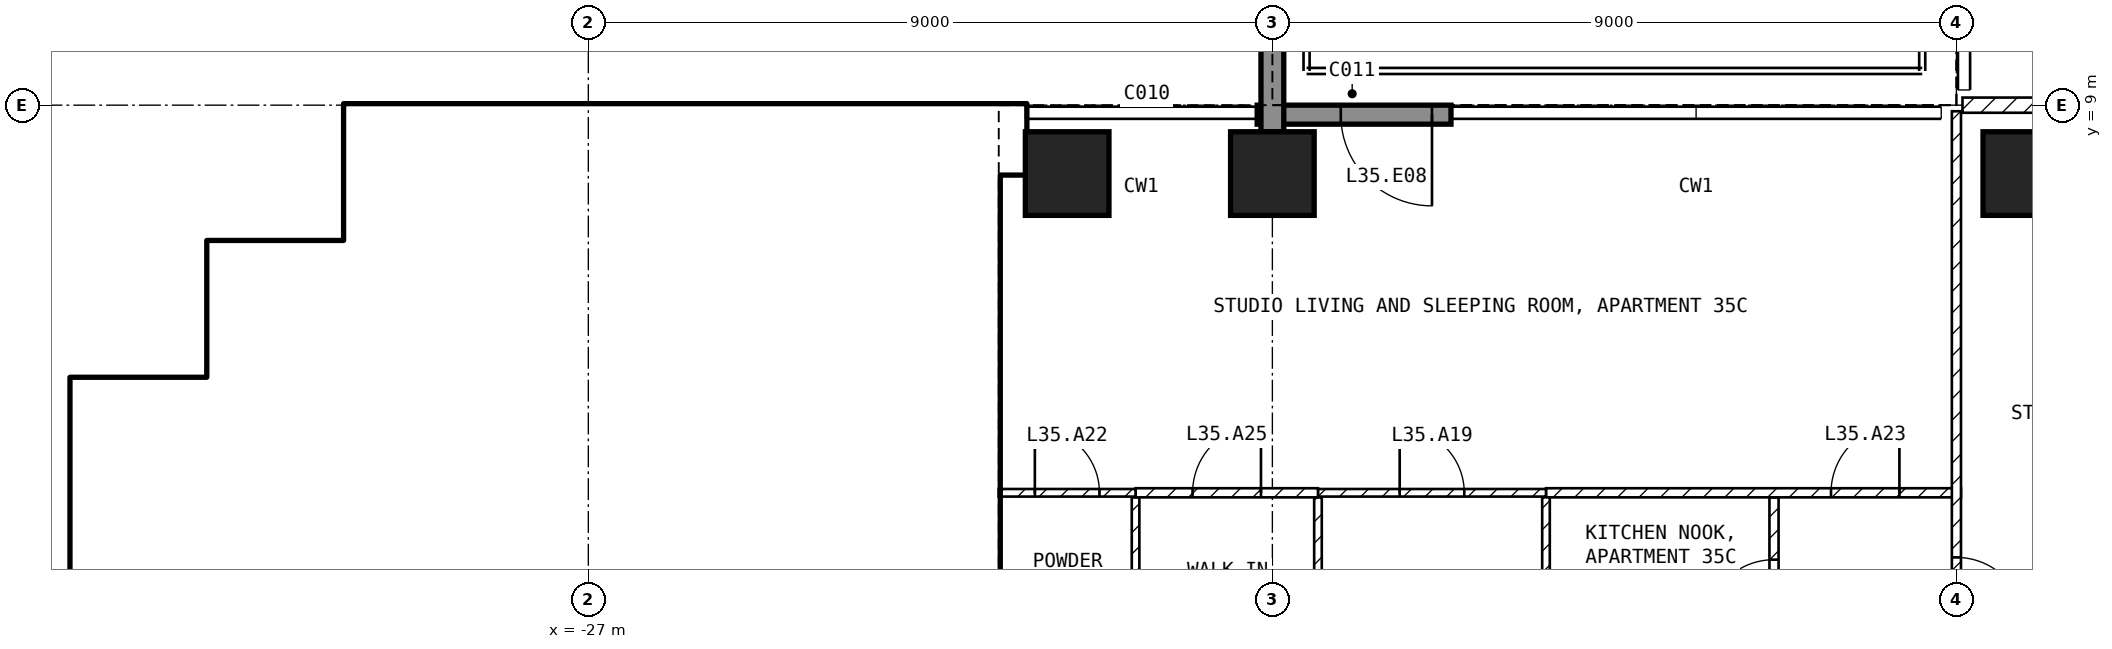
"""IFC4 building model, lengths in metres.
Left out: names, types, materials, properties, quantities, classifications, styles, units other than length and angle.
Written with IfcOpenShell. Run it as: python <this file> out.ifc"""

import sys

from ifc_helpers import new_model, si_unit, direction, frame, frame_2d, origin, origin_2d, place, context, subcontext, project, spatial, rectangle, extrude, element, fill, save


model = new_model("IFC4")
c1 = context("Model", 3, precision=1e-05, world=origin(), true_north=direction((0.0, 1.0)))
c2 = subcontext(c1, "Body", "Model", "MODEL_VIEW")
j1 = project(units=[si_unit("LENGTHUNIT", "METRE"), si_unit("PLANEANGLEUNIT", "RADIAN")], contexts=[c1])
p1 = place(None, origin())
s1 = spatial("IfcSite", under=j1, at=p1, CompositionType="ELEMENT")
p2 = place(p1, origin())
s2 = spatial("IfcBuilding", under=s1, at=p2, CompositionType="ELEMENT")
p3 = place(p2, frame((0.0, 0.0, 144.4)))
s3 = spatial("IfcBuildingStorey", under=s2, at=p3, CompositionType="ELEMENT", Elevation=144.4)
for number, where, z_axis, x_axis in (
    (1, (-20.7, 8.1, -0.25), (0.0, 0.0, 1.0), (1.0, 0.0, 0.0)),
    (2, (-18.0, 8.1, -0.25), (0.0, 0.0, 1.0), (1.0, 0.0, 0.0)),
    (3, (-8.1, 8.1, -0.25), (0.0, 0.0, 1.0), (1.0, 0.0, 0.0)),
):
    element("IfcColumn", number, at=place(p3, frame(where, z_axis=z_axis, x_axis=x_axis)), inside=s3, PredefinedType="COLUMN", context=c2, shape_type="SweptSolid", body=[
        extrude(rectangle(XDim=1.1, YDim=1.1, at=origin_2d()), origin(), (0.0, 0.0, 1.0), 3.5),
    ])
p4 = place(p3, frame((-15.65, 8.875, 0.0), z_axis=(0.0, 0.0, 1.0), x_axis=(-1.0, 0.0, 0.0)))
e4 = element("IfcWall", 4, at=p4, inside=s3, PredefinedType="SOLIDWALL", context=c2, shape_type="SweptSolid", body=[
    extrude(rectangle(XDim=2.55, YDim=0.25, at=frame_2d((1.275, 0.0))), origin(), (0.0, 0.0, 1.0), 3.25),
])
p5 = place(p4, frame((0.25, 0.0, 0.0)))
e5 = element("IfcOpeningElement", 5, at=p5, cuts=e4, PredefinedType="OPENING", context=c2, shape_type="SweptSolid", body=[
    extrude(rectangle(XDim=1.2, YDim=2.4, at=frame_2d((0.6, 1.2))), frame((0.0, 0.135, 0.0), z_axis=(0.0, -1.0, 0.0), x_axis=(1.0, 0.0, 0.0)), (0.0, 0.0, 1.0), 0.27),
])
p6 = place(p3, frame((-18.0, 8.65, 0.0), z_axis=(0.0, 0.0, 1.0), x_axis=(0.0, 1.0, 0.0)))
e6 = element("IfcWall", 6, at=p6, inside=s3, PredefinedType="SOLIDWALL", context=c2, shape_type="SweptSolid", body=[
    extrude(rectangle(XDim=3.09, YDim=0.3, at=frame_2d((1.545, 0.0))), origin(), (0.0, 0.0, 1.0), 3.25),
])
p7 = place(p3, frame((-33.425, -4.65, 0.0), z_axis=(0.0, 0.0, 1.0), x_axis=(0.0, 1.0, 0.0)))
e7 = element("IfcWall", 7, at=p7, inside=s3, PredefinedType="SHEAR", context=c2, shape_type="SweptSolid", body=[
    extrude(rectangle(XDim=10.05, YDim=0.75, at=frame_2d((5.025, 0.0))), origin(), (0.0, 0.0, 1.0), 3.25),
])
for number, where, z_axis, x_axis in (
    (8, (-33.05, 5.025, 0.0), (0.0, 0.0, 1.0), (1.0, 0.0, 0.0)),
    (9, (-31.625, 5.4, 0.0), (0.0, 0.0, 1.0), (0.0, 1.0, 0.0)),
):
    element("IfcWall", number, at=place(p3, frame(where, z_axis=z_axis, x_axis=x_axis)), inside=s3, PredefinedType="SHEAR", context=c2, shape_type="SweptSolid", body=[
        extrude(rectangle(XDim=1.8, YDim=0.75, at=frame_2d((0.9, 0.0))), origin(), (0.0, 0.0, 1.0), 3.25),
    ])
p8 = place(p3, frame((-31.25, 6.825, 0.0), z_axis=(0.0, 0.0, 1.0), x_axis=(1.0, 0.0, 0.0)))
e10 = element("IfcWall", 10, at=p8, inside=s3, PredefinedType="SHEAR", context=c2, shape_type="SweptSolid", body=[
    extrude(rectangle(XDim=2.175, YDim=0.75, at=frame_2d((1.087, 0.0))), origin(), (0.0, 0.0, 1.0), 3.25),
])
p9 = place(p3, frame((-29.825, 7.2, 0.0), z_axis=(0.0, 0.0, 1.0), x_axis=(0.0, 1.0, 0.0)))
e11 = element("IfcWall", 11, at=p9, inside=s3, PredefinedType="SHEAR", context=c2, shape_type="SweptSolid", body=[
    extrude(rectangle(XDim=1.8, YDim=0.75, at=frame_2d((0.9, 0.0))), origin(), (0.0, 0.0, 1.0), 3.25),
])
p10 = place(p3, frame((-29.45, 8.55, 0.0), z_axis=(0.0, 0.0, 1.0), x_axis=(1.0, 0.0, 0.0)))
e12 = element("IfcWall", 12, at=p10, inside=s3, PredefinedType="SHEAR", context=c2, shape_type="SweptSolid", body=[
    extrude(rectangle(XDim=8.2, YDim=0.9, at=frame_2d((4.1, 0.0))), origin(), (0.0, 0.0, 1.0), 3.25),
])
p11 = place(p3, frame((-21.825, 1.2, 0.0), z_axis=(0.0, 0.0, 1.0), x_axis=(0.0, 1.0, 0.0)))
e13 = element("IfcWall", 13, at=p11, inside=s3, PredefinedType="SHEAR", context=c2, shape_type="SweptSolid", body=[
    extrude(rectangle(XDim=6.9, YDim=0.45, at=frame_2d((3.45, 0.0))), origin(), (0.0, 0.0, 1.0), 3.25),
])
p12 = place(p3, frame((-28.35, 5.15, 0.0), z_axis=(0.0, 0.0, 1.0), x_axis=(1.0, 0.0, 0.0)))
e14 = element("IfcWall", 14, at=p12, inside=s3, PredefinedType="SOLIDWALL", context=c2, shape_type="SweptSolid", body=[
    extrude(rectangle(XDim=6.3, YDim=0.2, at=frame_2d((3.15, 0.0))), origin(), (0.0, 0.0, 1.0), 3.25),
])
p13 = place(p12, frame((5.1, 0.0, 0.0)))
e15 = element("IfcOpeningElement", 15, at=p13, cuts=e14, PredefinedType="OPENING", context=c2, shape_type="SweptSolid", body=[
    extrude(rectangle(XDim=1.0, YDim=2.1, at=frame_2d((0.5, 1.05))), frame((0.0, 0.11, 0.0), z_axis=(0.0, -1.0, 0.0), x_axis=(1.0, 0.0, 0.0)), (0.0, 0.0, 1.0), 0.22),
])
p14 = place(p3, frame((-28.25, 5.25, 0.0), z_axis=(0.0, 0.0, 1.0), x_axis=(0.0, 1.0, 0.0)))
e16 = element("IfcWall", 16, at=p14, inside=s3, PredefinedType="SOLIDWALL", context=c2, shape_type="SweptSolid", body=[
    extrude(rectangle(XDim=2.85, YDim=0.2, at=frame_2d((1.425, 0.0))), origin(), (0.0, 0.0, 1.0), 3.25),
])
p15 = place(p3, frame((-33.05, 3.95, 0.0), z_axis=(0.0, 0.0, 1.0), x_axis=(1.0, 0.0, 0.0)))
e17 = element("IfcWall", 17, at=p15, inside=s3, PredefinedType="SOLIDWALL", context=c2, shape_type="SweptSolid", body=[
    extrude(rectangle(XDim=5.85, YDim=0.2, at=frame_2d((2.925, 0.0))), origin(), (0.0, 0.0, 1.0), 3.25),
])
p16 = place(p3, frame((-27.1, 1.55, 0.0), z_axis=(0.0, 0.0, 1.0), x_axis=(0.0, 1.0, 0.0)))
e18 = element("IfcWall", 18, at=p16, inside=s3, PredefinedType="SOLIDWALL", context=c2, shape_type="SweptSolid", body=[
    extrude(rectangle(XDim=3.5, YDim=0.2, at=frame_2d((1.75, 0.0))), origin(), (0.0, 0.0, 1.0), 3.25),
])
p17 = place(p16, frame((0.6, 0.0, 0.0)))
e19 = element("IfcOpeningElement", 19, at=p17, cuts=e18, PredefinedType="OPENING", context=c2, shape_type="SweptSolid", body=[
    extrude(rectangle(XDim=1.1, YDim=2.1, at=frame_2d((0.55, 1.05))), frame((0.0, 0.11, 0.0), z_axis=(0.0, -1.0, 0.0), x_axis=(1.0, 0.0, 0.0)), (0.0, 0.0, 1.0), 0.22),
])
p18 = place(p16, frame((2.6, 0.0, 0.0)))
e20 = element("IfcOpeningElement", 20, at=p18, cuts=e18, PredefinedType="OPENING", context=c2, shape_type="SweptSolid", body=[
    extrude(rectangle(XDim=0.8, YDim=2.1, at=frame_2d((0.4, 1.05))), frame((0.0, 0.11, 0.0), z_axis=(0.0, -1.0, 0.0), x_axis=(1.0, 0.0, 0.0)), (0.0, 0.0, 1.0), 0.22),
])
p19 = place(p3, frame((-30.0, 1.55, 0.0), z_axis=(0.0, 0.0, 1.0), x_axis=(0.0, 1.0, 0.0)))
e21 = element("IfcWall", 21, at=p19, inside=s3, PredefinedType="SOLIDWALL", context=c2, shape_type="SweptSolid", body=[
    extrude(rectangle(XDim=2.3, YDim=0.2, at=frame_2d((1.15, 0.0))), origin(), (0.0, 0.0, 1.0), 3.25),
])
p20 = place(p3, frame((-29.0, 4.05, 0.0), z_axis=(0.0, 0.0, 1.0), x_axis=(0.0, 1.0, 0.0)))
e22 = element("IfcWall", 22, at=p20, inside=s3, PredefinedType="PARTITIONING", context=c2, shape_type="SweptSolid", body=[
    extrude(rectangle(XDim=4.05, YDim=0.15, at=frame_2d((2.025, 0.0))), origin(), (0.0, 0.0, 1.0), 3.25),
])
p21 = place(p20, frame((0.1, 0.0, 0.0)))
e23 = element("IfcOpeningElement", 23, at=p21, cuts=e22, PredefinedType="OPENING", context=c2, shape_type="SweptSolid", body=[
    extrude(rectangle(XDim=0.8, YDim=2.1, at=frame_2d((0.4, 1.05))), frame((0.0, 0.085, 0.0), z_axis=(0.0, -1.0, 0.0), x_axis=(1.0, 0.0, 0.0)), (0.0, 0.0, 1.0), 0.17),
])
p22 = place(p3, frame((-8.92, 9.0, 0.0), z_axis=(0.0, 0.0, 1.0), x_axis=(1.0, 0.0, 0.0)))
e24 = element("IfcWall", 24, at=p22, inside=s3, PredefinedType="PARTITIONING", context=c2, shape_type="SweptSolid", body=[
    extrude(rectangle(XDim=17.84, YDim=0.2, at=frame_2d((8.92, 0.0))), origin(), (0.0, 0.0, 1.0), 3.25),
])
p23 = place(p22, frame((8.42, 0.0, 0.0)))
e25 = element("IfcOpeningElement", 25, at=p23, cuts=e24, PredefinedType="OPENING", context=c2, shape_type="SweptSolid", body=[
    extrude(rectangle(XDim=1.0, YDim=2.1, at=frame_2d((0.5, 1.05))), frame((0.0, 0.11, 0.0), z_axis=(0.0, -1.0, 0.0), x_axis=(1.0, 0.0, 0.0)), (0.0, 0.0, 1.0), 0.22),
])
p24 = place(p3, frame((-11.4, 1.3, 0.0), z_axis=(0.0, 0.0, 1.0), x_axis=(0.0, 1.0, 0.0)))
e26 = element("IfcWall", 26, at=p24, inside=s3, PredefinedType="PARTITIONING", context=c2, shape_type="SweptSolid", body=[
    extrude(rectangle(XDim=2.54, YDim=0.12, at=frame_2d((1.27, 0.0))), origin(), (0.0, 0.0, 1.0), 3.25),
])
p25 = place(p24, frame((0.82, 0.0, 0.0)))
e27 = element("IfcOpeningElement", 27, at=p25, cuts=e26, PredefinedType="OPENING", context=c2, shape_type="SweptSolid", body=[
    extrude(rectangle(XDim=0.9, YDim=2.1, at=frame_2d((0.45, 1.05))), frame((0.0, 0.07, 0.0), z_axis=(0.0, -1.0, 0.0), x_axis=(1.0, 0.0, 0.0)), (0.0, 0.0, 1.0), 0.14),
])
p26 = place(p3, frame((-14.4, 3.9, 0.0), z_axis=(0.0, 0.0, 1.0), x_axis=(1.0, 0.0, 0.0)))
e28 = element("IfcWall", 28, at=p26, inside=s3, PredefinedType="PARTITIONING", context=c2, shape_type="SweptSolid", body=[
    extrude(rectangle(XDim=5.46, YDim=0.12, at=frame_2d((2.73, 0.0))), origin(), (0.0, 0.0, 1.0), 3.25),
])
p27 = place(p26, frame((3.75, 0.0, 0.0)))
e29 = element("IfcOpeningElement", 29, at=p27, cuts=e28, PredefinedType="OPENING", context=c2, shape_type="SweptSolid", body=[
    extrude(rectangle(XDim=0.9, YDim=2.1, at=frame_2d((0.45, 1.05))), frame((0.0, 0.07, 0.0), z_axis=(0.0, -1.0, 0.0), x_axis=(1.0, 0.0, 0.0)), (0.0, 0.0, 1.0), 0.14),
])
p28 = place(p3, frame((-9.0, 8.92, 0.0), z_axis=(0.0, 0.0, 1.0), x_axis=(0.0, -1.0, 0.0)))
e30 = element("IfcWall", 30, at=p28, inside=s3, PredefinedType="PARTITIONING", context=c2, shape_type="SweptSolid", body=[
    extrude(rectangle(XDim=7.62, YDim=0.12, at=frame_2d((3.81, 0.0))), origin(), (0.0, 0.0, 1.0), 3.25),
])
p29 = place(p28, frame((5.87, 0.0, 0.0)))
e31 = element("IfcOpeningElement", 31, at=p29, cuts=e30, PredefinedType="OPENING", context=c2, shape_type="SweptSolid", body=[
    extrude(rectangle(XDim=0.9, YDim=2.1, at=frame_2d((0.45, 1.05))), frame((0.0, 0.07, 0.0), z_axis=(0.0, -1.0, 0.0), x_axis=(1.0, 0.0, 0.0)), (0.0, 0.0, 1.0), 0.14),
])
for number, where, z_axis, x_axis in (
    (32, (-14.4, 1.3, 0.0), (0.0, 0.0, 1.0), (0.0, 1.0, 0.0)),
    (33, (-17.4, 1.3, 0.0), (0.0, 0.0, 1.0), (0.0, 1.0, 0.0)),
):
    element("IfcWall", number, at=place(p3, frame(where, z_axis=z_axis, x_axis=x_axis)), inside=s3, PredefinedType="PARTITIONING", context=c2, shape_type="SweptSolid", body=[
        extrude(rectangle(XDim=2.54, YDim=0.1, at=frame_2d((1.27, 0.0))), origin(), (0.0, 0.0, 1.0), 3.25),
    ])
p30 = place(p3, frame((-17.4, 3.9, 0.0), z_axis=(0.0, 0.0, 1.0), x_axis=(1.0, 0.0, 0.0)))
e34 = element("IfcWall", 34, at=p30, inside=s3, PredefinedType="PARTITIONING", context=c2, shape_type="SweptSolid", body=[
    extrude(rectangle(XDim=3.0, YDim=0.1, at=frame_2d((1.5, 0.0))), origin(), (0.0, 0.0, 1.0), 3.25),
])
p31 = place(p30, frame((1.075, 0.0, 0.0)))
e35 = element("IfcOpeningElement", 35, at=p31, cuts=e34, PredefinedType="OPENING", context=c2, shape_type="SweptSolid", body=[
    extrude(rectangle(XDim=0.85, YDim=2.1, at=frame_2d((0.425, 1.05))), frame((0.0, 0.06, 0.0), z_axis=(0.0, -1.0, 0.0), x_axis=(1.0, 0.0, 0.0)), (0.0, 0.0, 1.0), 0.12),
])
p32 = place(p3, frame((-19.8, 1.3, 0.0), z_axis=(0.0, 0.0, 1.0), x_axis=(0.0, 1.0, 0.0)))
e36 = element("IfcWall", 36, at=p32, inside=s3, PredefinedType="PARTITIONING", context=c2, shape_type="SweptSolid", body=[
    extrude(rectangle(XDim=2.54, YDim=0.1, at=frame_2d((1.27, 0.0))), origin(), (0.0, 0.0, 1.0), 3.25),
])
p33 = place(p3, frame((-19.8, 3.9, 0.0), z_axis=(0.0, 0.0, 1.0), x_axis=(1.0, 0.0, 0.0)))
e37 = element("IfcWall", 37, at=p33, inside=s3, PredefinedType="PARTITIONING", context=c2, shape_type="SweptSolid", body=[
    extrude(rectangle(XDim=2.4, YDim=0.12, at=frame_2d((1.2, 0.0))), origin(), (0.0, 0.0, 1.0), 3.25),
])
p34 = place(p33, frame((0.75, 0.0, 0.0)))
e38 = element("IfcOpeningElement", 38, at=p34, cuts=e37, PredefinedType="OPENING", context=c2, shape_type="SweptSolid", body=[
    extrude(rectangle(XDim=0.9, YDim=2.1, at=frame_2d((0.45, 1.05))), frame((0.0, 0.07, 0.0), z_axis=(0.0, -1.0, 0.0), x_axis=(1.0, 0.0, 0.0)), (0.0, 0.0, 1.0), 0.14),
])
p35 = place(p3, frame((-21.6, 3.9, 0.0), z_axis=(0.0, 0.0, 1.0), x_axis=(1.0, 0.0, 0.0)))
e39 = element("IfcWall", 39, at=p35, inside=s3, PredefinedType="PARTITIONING", context=c2, shape_type="SweptSolid", body=[
    extrude(rectangle(XDim=1.8, YDim=0.1, at=frame_2d((0.9, 0.0))), origin(), (0.0, 0.0, 1.0), 3.25),
])
p36 = place(p35, frame((0.475, 0.0, 0.0)))
e40 = element("IfcOpeningElement", 40, at=p36, cuts=e39, PredefinedType="OPENING", context=c2, shape_type="SweptSolid", body=[
    extrude(rectangle(XDim=0.85, YDim=2.1, at=frame_2d((0.425, 1.05))), frame((0.0, 0.06, 0.0), z_axis=(0.0, -1.0, 0.0), x_axis=(1.0, 0.0, 0.0)), (0.0, 0.0, 1.0), 0.12),
])
p37 = place(p5, origin())
e41 = element("IfcDoor", 41, at=p37, inside=s3, OperationType="SINGLE_SWING_LEFT", PredefinedType="DOOR", context=c2, shape_type="SweptSolid", body=[
    extrude(rectangle(XDim=1.2, YDim=2.4, at=frame_2d((0.6, 1.2))), frame((0.0, 0.025, 0.0), z_axis=(0.0, -1.0, 0.0), x_axis=(1.0, 0.0, 0.0)), (0.0, 0.0, 1.0), 0.05),
])
fill(e5, e41)
p38 = place(p17, origin())
e42 = element("IfcDoor", 42, at=p38, inside=s3, OperationType="DOUBLE_DOOR_SLIDING", PredefinedType="DOOR", context=c2, shape_type="SweptSolid", body=[
    extrude(rectangle(XDim=1.1, YDim=2.1, at=frame_2d((0.55, 1.05))), frame((0.0, 0.025, 0.0), z_axis=(0.0, -1.0, 0.0), x_axis=(1.0, 0.0, 0.0)), (0.0, 0.0, 1.0), 0.05),
])
fill(e19, e42)
p39 = place(p13, origin())
e43 = element("IfcDoor", 43, at=p39, inside=s3, OperationType="SINGLE_SWING_LEFT", PredefinedType="DOOR", context=c2, shape_type="SweptSolid", body=[
    extrude(rectangle(XDim=1.0, YDim=2.1, at=frame_2d((0.5, 1.05))), frame((0.0, 0.025, 0.0), z_axis=(0.0, -1.0, 0.0), x_axis=(1.0, 0.0, 0.0)), (0.0, 0.0, 1.0), 0.05),
])
fill(e15, e43)
p40 = place(p18, origin())
e44 = element("IfcDoor", 44, at=p40, inside=s3, OperationType="SINGLE_SWING_LEFT", PredefinedType="DOOR", context=c2, shape_type="SweptSolid", body=[
    extrude(rectangle(XDim=0.8, YDim=2.1, at=frame_2d((0.4, 1.05))), frame((0.0, 0.025, 0.0), z_axis=(0.0, -1.0, 0.0), x_axis=(1.0, 0.0, 0.0)), (0.0, 0.0, 1.0), 0.05),
])
fill(e20, e44)
p41 = place(p21, origin())
e45 = element("IfcDoor", 45, at=p41, inside=s3, OperationType="SINGLE_SWING_LEFT", PredefinedType="DOOR", context=c2, shape_type="SweptSolid", body=[
    extrude(rectangle(XDim=0.8, YDim=2.1, at=frame_2d((0.4, 1.05))), frame((0.0, 0.025, 0.0), z_axis=(0.0, -1.0, 0.0), x_axis=(1.0, 0.0, 0.0)), (0.0, 0.0, 1.0), 0.05),
])
fill(e23, e45)
p42 = place(p31, origin())
e46 = element("IfcDoor", 46, at=p42, inside=s3, OperationType="SINGLE_SWING_LEFT", PredefinedType="DOOR", context=c2, shape_type="SweptSolid", body=[
    extrude(rectangle(XDim=0.85, YDim=2.1, at=frame_2d((0.425, 1.05))), frame((0.0, 0.025, 0.0), z_axis=(0.0, -1.0, 0.0), x_axis=(1.0, 0.0, 0.0)), (0.0, 0.0, 1.0), 0.05),
])
fill(e35, e46)
p43 = place(p25, origin())
e47 = element("IfcDoor", 47, at=p43, inside=s3, OperationType="SINGLE_SWING_LEFT", PredefinedType="DOOR", context=c2, shape_type="SweptSolid", body=[
    extrude(rectangle(XDim=0.9, YDim=2.1, at=frame_2d((0.45, 1.05))), frame((0.0, 0.025, 0.0), z_axis=(0.0, -1.0, 0.0), x_axis=(1.0, 0.0, 0.0)), (0.0, 0.0, 1.0), 0.05),
])
fill(e27, e47)
p44 = place(p36, origin())
e48 = element("IfcDoor", 48, at=p44, inside=s3, OperationType="SINGLE_SWING_LEFT", PredefinedType="DOOR", context=c2, shape_type="SweptSolid", body=[
    extrude(rectangle(XDim=0.85, YDim=2.1, at=frame_2d((0.425, 1.05))), frame((0.0, 0.025, 0.0), z_axis=(0.0, -1.0, 0.0), x_axis=(1.0, 0.0, 0.0)), (0.0, 0.0, 1.0), 0.05),
])
fill(e40, e48)
p45 = place(p27, origin())
e49 = element("IfcDoor", 49, at=p45, inside=s3, OperationType="SINGLE_SWING_RIGHT", PredefinedType="DOOR", context=c2, shape_type="SweptSolid", body=[
    extrude(rectangle(XDim=0.9, YDim=2.1, at=frame_2d((0.45, 1.05))), frame((0.0, 0.025, 0.0), z_axis=(0.0, -1.0, 0.0), x_axis=(1.0, 0.0, 0.0)), (0.0, 0.0, 1.0), 0.05),
])
fill(e29, e49)
p46 = place(p29, origin())
e50 = element("IfcDoor", 50, at=p46, inside=s3, OperationType="SINGLE_SWING_RIGHT", PredefinedType="DOOR", context=c2, shape_type="SweptSolid", body=[
    extrude(rectangle(XDim=0.9, YDim=2.1, at=frame_2d((0.45, 1.05))), frame((0.0, 0.025, 0.0), z_axis=(0.0, -1.0, 0.0), x_axis=(1.0, 0.0, 0.0)), (0.0, 0.0, 1.0), 0.05),
])
fill(e31, e50)
p47 = place(p34, origin())
e51 = element("IfcDoor", 51, at=p47, inside=s3, OperationType="SINGLE_SWING_RIGHT", PredefinedType="DOOR", context=c2, shape_type="SweptSolid", body=[
    extrude(rectangle(XDim=0.9, YDim=2.1, at=frame_2d((0.45, 1.05))), frame((0.0, 0.025, 0.0), z_axis=(0.0, -1.0, 0.0), x_axis=(1.0, 0.0, 0.0)), (0.0, 0.0, 1.0), 0.05),
])
fill(e38, e51)
save(model, sys.argv[1])
